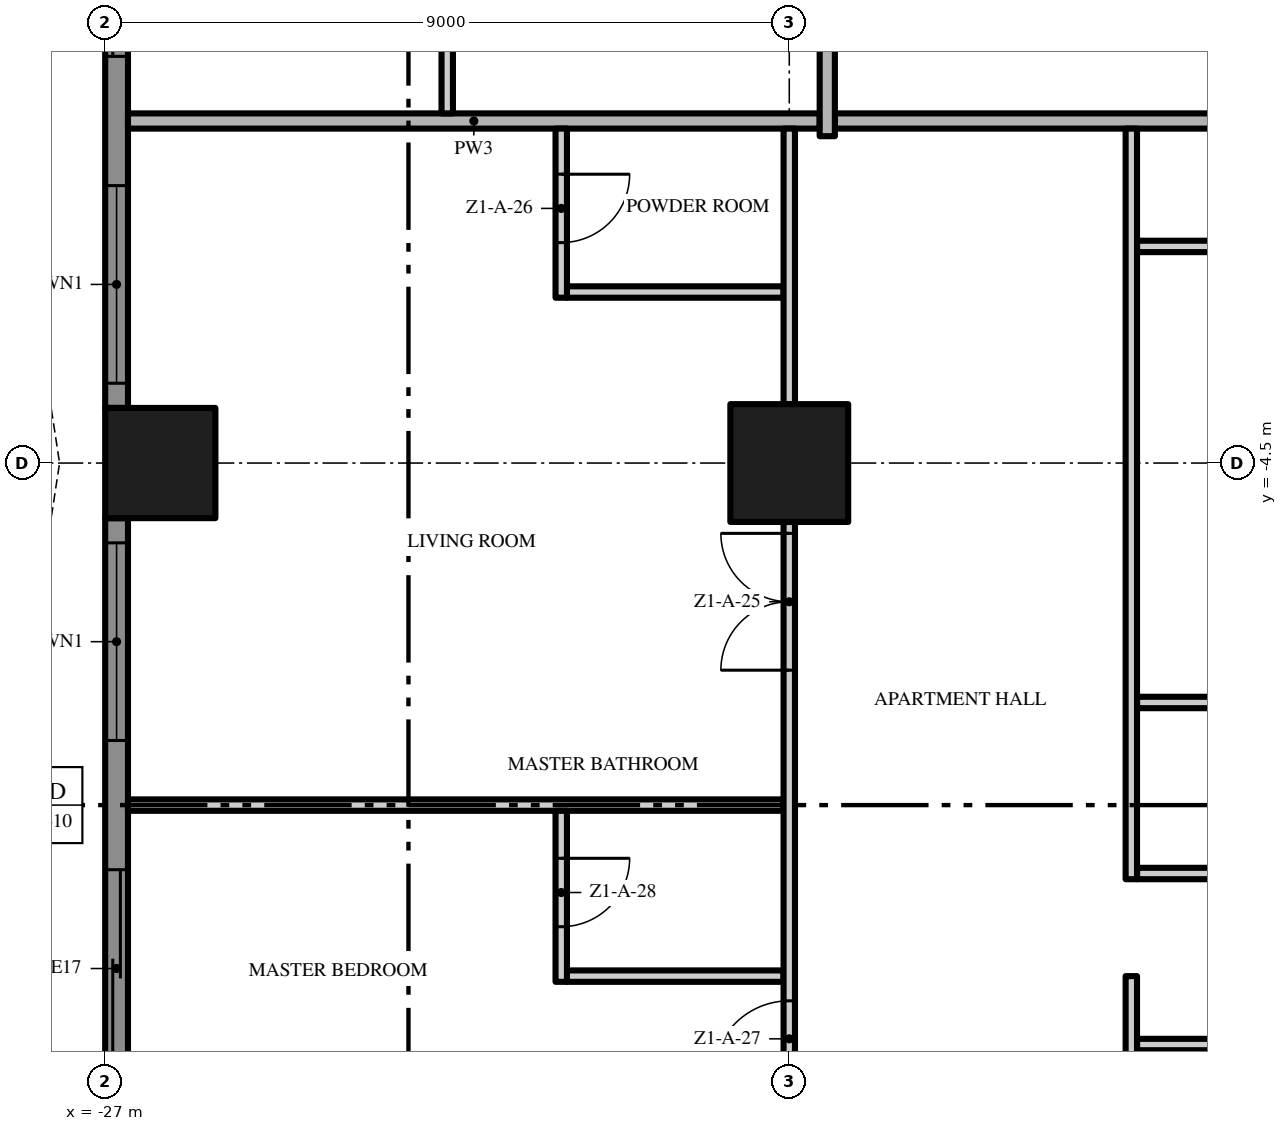
"""IFC4 building model, lengths in metres.
Left out: names, types, materials, properties, quantities, classifications, styles, units other than length and angle.
Written with IfcOpenShell. Run it as: python <this file> out.ifc"""

import sys

from ifc_helpers import new_model, si_unit, direction, frame, frame_2d, origin, origin_2d, place, context, subcontext, project, spatial, polyline, rectangle, outline, extrude, element, fill, save


model = new_model("IFC4")
c1 = context("Model", 3, precision=1e-05, world=origin(), true_north=direction((0.0, 1.0)))
c2 = subcontext(c1, "Body", "Model", "MODEL_VIEW")
j1 = project(units=[si_unit("LENGTHUNIT", "METRE"), si_unit("PLANEANGLEUNIT", "RADIAN")], contexts=[c1])
p1 = place(None, origin())
s1 = spatial("IfcSite", under=j1, at=p1, CompositionType="ELEMENT")
p2 = place(p1, origin())
s2 = spatial("IfcBuilding", under=s1, at=p2, CompositionType="ELEMENT")
p3 = place(p2, frame((0.0, 0.0, 22.6)))
s3 = spatial("IfcBuildingStorey", under=s2, at=p3, CompositionType="ELEMENT", Elevation=22.6)
p4 = place(p3, frame((-18.0, -4.5, 0.0), z_axis=(0.0, 0.0, 1.0), x_axis=(1.0, 0.0, 0.0)))
e1 = element("IfcColumn", 1, at=p4, inside=s3, PredefinedType="COLUMN", context=c2, shape_type="SweptSolid", body=[
    extrude(rectangle(XDim=1.55, YDim=1.55, at=origin_2d()), origin(), (0.0, 0.0, 1.0), 3.5),
])
p5 = place(p3, frame((-26.275, -4.5, 0.0), z_axis=(0.0, 0.0, 1.0), x_axis=(1.0, 0.0, 0.0)))
e2 = element("IfcColumn", 2, at=p5, inside=s3, PredefinedType="COLUMN", context=c2, shape_type="SweptSolid", body=[
    extrude(rectangle(XDim=1.45, YDim=1.45, at=origin_2d()), origin(), (0.0, 0.0, 1.0), 3.5),
])
p6 = place(p3, frame((-26.85, -3.775, 0.0), z_axis=(0.0, 0.0, 1.0), x_axis=(0.0, 1.0, 0.0)))
e3 = element("IfcWall", 3, at=p6, inside=s3, PredefinedType="SOLIDWALL", context=c2, shape_type="SweptSolid", body=[
    extrude(rectangle(XDim=7.55, YDim=0.3, at=frame_2d((3.775, 0.0))), origin(), (0.0, 0.0, 1.0), 3.5),
])
p7 = place(p6, frame((4.625, 0.0, 0.0)))
e4 = element("IfcOpeningElement", 4, at=p7, cuts=e3, PredefinedType="OPENING", context=c2, shape_type="SweptSolid", body=[
    extrude(rectangle(XDim=2.6, YDim=2.4, at=frame_2d((1.3, 1.2))), frame((0.0, 0.16, 0.0), z_axis=(0.0, -1.0, 0.0), x_axis=(1.0, 0.0, 0.0)), (0.0, 0.0, 1.0), 0.32),
])
p8 = place(p6, frame((0.325, 0.0, 0.45)))
e5 = element("IfcOpeningElement", 5, at=p8, cuts=e3, PredefinedType="OPENING", context=c2, shape_type="SweptSolid", body=[
    extrude(rectangle(XDim=2.6, YDim=2.65, at=frame_2d((1.3, 1.325))), frame((0.0, 0.16, 0.0), z_axis=(0.0, -1.0, 0.0), x_axis=(1.0, 0.0, 0.0)), (0.0, 0.0, 1.0), 0.32),
])
p9 = place(p3, frame((-26.85, -12.775, 0.0), z_axis=(0.0, 0.0, 1.0), x_axis=(0.0, 1.0, 0.0)))
e6 = element("IfcWall", 6, at=p9, inside=s3, PredefinedType="SOLIDWALL", context=c2, shape_type="SweptSolid", body=[
    extrude(rectangle(XDim=7.55, YDim=0.3, at=frame_2d((3.775, 0.0))), origin(), (0.0, 0.0, 1.0), 3.5),
])
p10 = place(p9, frame((4.625, 0.0, 0.45)))
e7 = element("IfcOpeningElement", 7, at=p10, cuts=e6, PredefinedType="OPENING", context=c2, shape_type="SweptSolid", body=[
    extrude(rectangle(XDim=2.6, YDim=2.65, at=frame_2d((1.3, 1.325))), frame((0.0, 0.16, 0.0), z_axis=(0.0, -1.0, 0.0), x_axis=(1.0, 0.0, 0.0)), (0.0, 0.0, 1.0), 0.32),
])
p11 = place(p9, frame((0.325, 0.0, 0.0)))
e8 = element("IfcOpeningElement", 8, at=p11, cuts=e6, PredefinedType="OPENING", context=c2, shape_type="SweptSolid", body=[
    extrude(rectangle(XDim=2.6, YDim=2.4, at=frame_2d((1.3, 1.2))), frame((0.0, 0.16, 0.0), z_axis=(0.0, -1.0, 0.0), x_axis=(1.0, 0.0, 0.0)), (0.0, 0.0, 1.0), 0.32),
])
p12 = place(p3, origin())
e9 = element("IfcWall", 9, at=p12, inside=s3, PredefinedType="USERDEFINED", context=c2, shape_type="SweptSolid", body=[
    extrude(outline(polyline([(-30.0, 18.0), (-29.771, 16.5), (-29.171, 15.0), (-28.429, 13.5), (-27.829, 12.0), (-27.6, 10.5), (-27.829, 9.0), (-28.429, 7.5), (-29.171, 6.0), (-29.771, 4.5), (-30.0, 3.0), (-29.771, 1.5), (-29.171, 0.0), (-28.429, -1.5), (-27.829, -3.0), (-27.6, -4.5), (-27.829, -6.0), (-28.429, -7.5), (-29.171, -9.0), (-29.771, -10.5), (-30.0, -12.0), (-29.771, -13.5), (-29.171, -15.0), (-28.429, -16.5), (-27.829, -18.0), (-27.597, -17.907), (-28.201, -16.398), (-28.942, -14.898), (-29.528, -13.434), (-29.747, -12.0), (-29.528, -10.566), (-28.942, -9.102), (-28.201, -7.602), (-27.586, -6.066), (-27.347, -4.5), (-27.586, -2.934), (-28.201, -1.398), (-28.942, 0.102), (-29.528, 1.566), (-29.747, 3.0), (-29.528, 4.434), (-28.942, 5.898), (-28.201, 7.398), (-27.586, 8.934), (-27.347, 10.5), (-27.586, 12.066), (-28.201, 13.602), (-28.942, 15.102), (-29.528, 16.566), (-29.753, 18.038), (-30.0, 18.0)])), origin(), (0.0, 0.0, 1.0), 0.9),
])
p13 = place(p3, frame((-13.425, -12.15, 0.0), z_axis=(0.0, 0.0, 1.0), x_axis=(1.0, 0.0, 0.0)))
e10 = element("IfcWall", 10, at=p13, inside=s3, PredefinedType="PARTITIONING", context=c2, shape_type="SweptSolid", body=[
    extrude(rectangle(XDim=4.35, YDim=0.15, at=frame_2d((2.175, 0.0))), origin(), (0.0, 0.0, 1.0), 3.5),
])
p14 = place(p3, frame((-20.925, -11.25, 0.0), z_axis=(0.0, 0.0, 1.0), x_axis=(1.0, 0.0, 0.0)))
e11 = element("IfcWall", 11, at=p14, inside=s3, PredefinedType="PARTITIONING", context=c2, shape_type="SweptSolid", body=[
    extrude(rectangle(XDim=2.85, YDim=0.15, at=frame_2d((1.425, 0.0))), origin(), (0.0, 0.0, 1.0), 3.5),
])
p15 = place(p3, frame((-13.425, -9.9, 0.0), z_axis=(0.0, 0.0, 1.0), x_axis=(1.0, 0.0, 0.0)))
e12 = element("IfcWall", 12, at=p15, inside=s3, PredefinedType="PARTITIONING", context=c2, shape_type="SweptSolid", body=[
    extrude(rectangle(XDim=4.35, YDim=0.15, at=frame_2d((2.175, 0.0))), origin(), (0.0, 0.0, 1.0), 3.5),
])
p16 = place(p15, frame((1.75, 0.0, 0.0)))
e13 = element("IfcOpeningElement", 13, at=p16, cuts=e12, PredefinedType="OPENING", context=c2, shape_type="SweptSolid", body=[
    extrude(rectangle(XDim=0.9, YDim=2.1, at=frame_2d((0.45, 1.05))), frame((0.0, 0.085, 0.0), z_axis=(0.0, -1.0, 0.0), x_axis=(1.0, 0.0, 0.0)), (0.0, 0.0, 1.0), 0.17),
])
p17 = place(p3, frame((-26.7, -9.0, 0.0), z_axis=(0.0, 0.0, 1.0), x_axis=(1.0, 0.0, 0.0)))
e14 = element("IfcWall", 14, at=p17, inside=s3, PredefinedType="PARTITIONING", context=c2, shape_type="SweptSolid", body=[
    extrude(rectangle(XDim=8.625, YDim=0.15, at=frame_2d((4.312, 0.0))), origin(), (0.0, 0.0, 1.0), 3.5),
])
p18 = place(p3, frame((-13.425, -7.65, 0.0), z_axis=(0.0, 0.0, 1.0), x_axis=(1.0, 0.0, 0.0)))
e15 = element("IfcWall", 15, at=p18, inside=s3, PredefinedType="PARTITIONING", context=c2, shape_type="SweptSolid", body=[
    extrude(rectangle(XDim=4.35, YDim=0.15, at=frame_2d((2.175, 0.0))), origin(), (0.0, 0.0, 1.0), 3.5),
])
p19 = place(p3, frame((-20.925, -2.25, 0.0), z_axis=(0.0, 0.0, 1.0), x_axis=(1.0, 0.0, 0.0)))
e16 = element("IfcWall", 16, at=p19, inside=s3, PredefinedType="PARTITIONING", context=c2, shape_type="SweptSolid", body=[
    extrude(rectangle(XDim=2.85, YDim=0.15, at=frame_2d((1.425, 0.0))), origin(), (0.0, 0.0, 1.0), 3.5),
])
p20 = place(p3, frame((-13.425, -1.65, 0.0), z_axis=(0.0, 0.0, 1.0), x_axis=(1.0, 0.0, 0.0)))
e17 = element("IfcWall", 17, at=p20, inside=s3, PredefinedType="PARTITIONING", context=c2, shape_type="SweptSolid", body=[
    extrude(rectangle(XDim=4.35, YDim=0.15, at=frame_2d((2.175, 0.0))), origin(), (0.0, 0.0, 1.0), 3.5),
])
p21 = place(p3, frame((-17.4, 0.0, 0.0), z_axis=(0.0, 0.0, 1.0), x_axis=(1.0, 0.0, 0.0)))
e18 = element("IfcWall", 18, at=p21, inside=s3, PredefinedType="PARTITIONING", context=c2, shape_type="SweptSolid", body=[
    extrude(rectangle(XDim=12.8, YDim=0.2, at=frame_2d((6.4, 0.0))), origin(), (0.0, 0.0, 1.0), 3.5),
])
p22 = place(p3, frame((-26.7, 0.0, 0.0), z_axis=(0.0, 0.0, 1.0), x_axis=(1.0, 0.0, 0.0)))
e19 = element("IfcWall", 19, at=p22, inside=s3, PredefinedType="PARTITIONING", context=c2, shape_type="SweptSolid", body=[
    extrude(rectangle(XDim=9.1, YDim=0.2, at=frame_2d((4.55, 0.0))), origin(), (0.0, 0.0, 1.0), 3.5),
])
p23 = place(p3, frame((-22.5, 0.1, 0.0), z_axis=(0.0, 0.0, 1.0), x_axis=(0.0, 1.0, 0.0)))
e20 = element("IfcWall", 20, at=p23, inside=s3, PredefinedType="PARTITIONING", context=c2, shape_type="SweptSolid", body=[
    extrude(rectangle(XDim=17.175, YDim=0.15, at=frame_2d((8.588, 0.0))), origin(), (0.0, 0.0, 1.0), 3.5),
])
p24 = place(p23, frame((1.65, 0.0, 0.0)))
e21 = element("IfcOpeningElement", 21, at=p24, cuts=e20, PredefinedType="OPENING", context=c2, shape_type="SweptSolid", body=[
    extrude(rectangle(XDim=1.0, YDim=2.4, at=frame_2d((0.5, 1.2))), frame((0.0, 0.085, 0.0), z_axis=(0.0, -1.0, 0.0), x_axis=(1.0, 0.0, 0.0)), (0.0, 0.0, 1.0), 0.17),
])
p25 = place(p23, frame((7.25, 0.0, 0.0)))
e22 = element("IfcOpeningElement", 22, at=p25, cuts=e20, PredefinedType="OPENING", context=c2, shape_type="SweptSolid", body=[
    extrude(rectangle(XDim=1.0, YDim=2.4, at=frame_2d((0.5, 1.2))), frame((0.0, 0.085, 0.0), z_axis=(0.0, -1.0, 0.0), x_axis=(1.0, 0.0, 0.0)), (0.0, 0.0, 1.0), 0.17),
])
p26 = place(p23, frame((9.5, 0.0, 0.0)))
e23 = element("IfcOpeningElement", 23, at=p26, cuts=e20, PredefinedType="OPENING", context=c2, shape_type="SweptSolid", body=[
    extrude(rectangle(XDim=1.0, YDim=2.4, at=frame_2d((0.5, 1.2))), frame((0.0, 0.085, 0.0), z_axis=(0.0, -1.0, 0.0), x_axis=(1.0, 0.0, 0.0)), (0.0, 0.0, 1.0), 0.17),
])
p27 = place(p23, frame((16.025, 0.0, 0.0)))
e24 = element("IfcOpeningElement", 24, at=p27, cuts=e20, PredefinedType="OPENING", context=c2, shape_type="SweptSolid", body=[
    extrude(rectangle(XDim=1.0, YDim=2.4, at=frame_2d((0.5, 1.2))), frame((0.0, 0.085, 0.0), z_axis=(0.0, -1.0, 0.0), x_axis=(1.0, 0.0, 0.0)), (0.0, 0.0, 1.0), 0.17),
])
p28 = place(p3, frame((-21.0, -9.075, 0.0), z_axis=(0.0, 0.0, 1.0), x_axis=(0.0, -1.0, 0.0)))
e25 = element("IfcWall", 25, at=p28, inside=s3, PredefinedType="PARTITIONING", context=c2, shape_type="SweptSolid", body=[
    extrude(rectangle(XDim=2.25, YDim=0.15, at=frame_2d((1.125, 0.0))), origin(), (0.0, 0.0, 1.0), 3.5),
])
p29 = place(p28, frame((0.625, 0.0, 0.0)))
e26 = element("IfcOpeningElement", 26, at=p29, cuts=e25, PredefinedType="OPENING", context=c2, shape_type="SweptSolid", body=[
    extrude(rectangle(XDim=0.9, YDim=2.1, at=frame_2d((0.45, 1.05))), frame((0.0, 0.085, 0.0), z_axis=(0.0, -1.0, 0.0), x_axis=(1.0, 0.0, 0.0)), (0.0, 0.0, 1.0), 0.17),
])
p30 = place(p3, frame((-21.0, -0.1, 0.0), z_axis=(0.0, 0.0, 1.0), x_axis=(0.0, -1.0, 0.0)))
e27 = element("IfcWall", 27, at=p30, inside=s3, PredefinedType="PARTITIONING", context=c2, shape_type="SweptSolid", body=[
    extrude(rectangle(XDim=2.225, YDim=0.15, at=frame_2d((1.113, 0.0))), origin(), (0.0, 0.0, 1.0), 3.5),
])
p31 = place(p30, frame((0.6, 0.0, 0.0)))
e28 = element("IfcOpeningElement", 28, at=p31, cuts=e27, PredefinedType="OPENING", context=c2, shape_type="SweptSolid", body=[
    extrude(rectangle(XDim=0.9, YDim=2.1, at=frame_2d((0.45, 1.05))), frame((0.0, 0.085, 0.0), z_axis=(0.0, -1.0, 0.0), x_axis=(1.0, 0.0, 0.0)), (0.0, 0.0, 1.0), 0.17),
])
p32 = place(p3, frame((-18.0, -12.725, 0.0), z_axis=(0.0, 0.0, 1.0), x_axis=(0.0, 1.0, 0.0)))
e29 = element("IfcWall", 29, at=p32, inside=s3, PredefinedType="PARTITIONING", context=c2, shape_type="SweptSolid", body=[
    extrude(rectangle(XDim=7.45, YDim=0.15, at=frame_2d((3.725, 0.0))), origin(), (0.0, 0.0, 1.0), 3.5),
])
p33 = place(p32, frame((5.5, 0.0, 0.0)))
e30 = element("IfcOpeningElement", 30, at=p33, cuts=e29, PredefinedType="OPENING", context=c2, shape_type="SweptSolid", body=[
    extrude(rectangle(XDim=1.8, YDim=2.4, at=frame_2d((0.9, 1.2))), frame((0.0, 0.085, 0.0), z_axis=(0.0, -1.0, 0.0), x_axis=(1.0, 0.0, 0.0)), (0.0, 0.0, 1.0), 0.17),
])
p34 = place(p32, frame((0.15, 0.0, 0.0)))
e31 = element("IfcOpeningElement", 31, at=p34, cuts=e29, PredefinedType="OPENING", context=c2, shape_type="SweptSolid", body=[
    extrude(rectangle(XDim=1.0, YDim=2.4, at=frame_2d((0.5, 1.2))), frame((0.0, 0.085, 0.0), z_axis=(0.0, -1.0, 0.0), x_axis=(1.0, 0.0, 0.0)), (0.0, 0.0, 1.0), 0.17),
])
p35 = place(p3, frame((-18.0, -3.725, 0.0), z_axis=(0.0, 0.0, 1.0), x_axis=(0.0, 1.0, 0.0)))
e32 = element("IfcWall", 32, at=p35, inside=s3, PredefinedType="PARTITIONING", context=c2, shape_type="SweptSolid", body=[
    extrude(rectangle(XDim=3.625, YDim=0.15, at=frame_2d((1.812, 0.0))), origin(), (0.0, 0.0, 1.0), 3.5),
])
p36 = place(p3, frame((-17.5, -0.2, 0.0), z_axis=(0.0, 0.0, 1.0), x_axis=(0.0, 1.0, 0.0)))
e33 = element("IfcWall", 33, at=p36, inside=s3, PredefinedType="PARTITIONING", context=c2, shape_type="SweptSolid", body=[
    extrude(rectangle(XDim=3.925, YDim=0.2, at=frame_2d((1.962, 0.0))), origin(), (0.0, 0.0, 1.0), 3.5),
])
p37 = place(p3, frame((-13.5, -11.25, 0.0), z_axis=(0.0, 0.0, 1.0), x_axis=(0.0, -1.0, 0.0)))
e34 = element("IfcWall", 34, at=p37, inside=s3, PredefinedType="PARTITIONING", context=c2, shape_type="SweptSolid", body=[
    extrude(rectangle(XDim=10.95, YDim=0.15, at=frame_2d((5.475, 0.0))), origin(), (0.0, 0.0, 1.0), 3.5),
])
p38 = place(p37, frame((1.8, 0.0, 0.0)))
e35 = element("IfcOpeningElement", 35, at=p38, cuts=e34, PredefinedType="OPENING", context=c2, shape_type="SweptSolid", body=[
    extrude(rectangle(XDim=0.8, YDim=2.0, at=frame_2d((0.4, 1.0))), frame((0.0, 0.085, 0.0), z_axis=(0.0, -1.0, 0.0), x_axis=(1.0, 0.0, 0.0)), (0.0, 0.0, 1.0), 0.17),
])
p39 = place(p37, frame((9.95, 0.0, 0.0)))
e36 = element("IfcOpeningElement", 36, at=p39, cuts=e34, PredefinedType="OPENING", context=c2, shape_type="SweptSolid", body=[
    extrude(rectangle(XDim=0.8, YDim=2.0, at=frame_2d((0.4, 1.0))), frame((0.0, 0.085, 0.0), z_axis=(0.0, -1.0, 0.0), x_axis=(1.0, 0.0, 0.0)), (0.0, 0.0, 1.0), 0.17),
])
p40 = place(p3, frame((-13.5, -9.975, 0.0), z_axis=(0.0, 0.0, 1.0), x_axis=(0.0, 1.0, 0.0)))
e37 = element("IfcWall", 37, at=p40, inside=s3, PredefinedType="PARTITIONING", context=c2, shape_type="SweptSolid", body=[
    extrude(rectangle(XDim=9.875, YDim=0.15, at=frame_2d((4.938, 0.0))), origin(), (0.0, 0.0, 1.0), 3.5),
])
p41 = place(p7, origin())
e38 = element("IfcDoor", 38, at=p41, inside=s3, OperationType="SINGLE_SWING_LEFT", PredefinedType="DOOR", context=c2, shape_type="SweptSolid", body=[
    extrude(rectangle(XDim=2.6, YDim=2.4, at=frame_2d((1.3, 1.2))), frame((0.0, 0.025, 0.0), z_axis=(0.0, -1.0, 0.0), x_axis=(1.0, 0.0, 0.0)), (0.0, 0.0, 1.0), 0.05),
])
fill(e4, e38)
p42 = place(p8, origin())
e39 = element("IfcWindow", 39, at=p42, inside=s3, PartitioningType="SINGLE_PANEL", PredefinedType="WINDOW", context=c2, shape_type="SweptSolid", body=[
    extrude(rectangle(XDim=2.6, YDim=2.65, at=frame_2d((1.3, 1.325))), frame((0.0, 0.03, 0.0), z_axis=(0.0, -1.0, 0.0), x_axis=(1.0, 0.0, 0.0)), (0.0, 0.0, 1.0), 0.06),
])
fill(e5, e39)
p43 = place(p10, origin())
e40 = element("IfcWindow", 40, at=p43, inside=s3, PartitioningType="SINGLE_PANEL", PredefinedType="WINDOW", context=c2, shape_type="SweptSolid", body=[
    extrude(rectangle(XDim=2.6, YDim=2.65, at=frame_2d((1.3, 1.325))), frame((0.0, 0.03, 0.0), z_axis=(0.0, -1.0, 0.0), x_axis=(1.0, 0.0, 0.0)), (0.0, 0.0, 1.0), 0.06),
])
fill(e7, e40)
p44 = place(p11, origin())
e41 = element("IfcDoor", 41, at=p44, inside=s3, OperationType="SINGLE_SWING_LEFT", PredefinedType="DOOR", context=c2, shape_type="SweptSolid", body=[
    extrude(rectangle(XDim=2.6, YDim=2.4, at=frame_2d((1.3, 1.2))), frame((0.0, 0.025, 0.0), z_axis=(0.0, -1.0, 0.0), x_axis=(1.0, 0.0, 0.0)), (0.0, 0.0, 1.0), 0.05),
])
fill(e8, e41)
p45 = place(p33, origin())
e42 = element("IfcDoor", 42, at=p45, inside=s3, OperationType="DOUBLE_DOOR_SINGLE_SWING", PredefinedType="DOOR", context=c2, shape_type="SweptSolid", body=[
    extrude(rectangle(XDim=1.8, YDim=2.4, at=frame_2d((0.9, 1.2))), frame((0.0, 0.025, 0.0), z_axis=(0.0, -1.0, 0.0), x_axis=(1.0, 0.0, 0.0)), (0.0, 0.0, 1.0), 0.05),
])
fill(e30, e42)
p46 = place(p31, origin())
e43 = element("IfcDoor", 43, at=p46, inside=s3, OperationType="SINGLE_SWING_LEFT", PredefinedType="DOOR", context=c2, shape_type="SweptSolid", body=[
    extrude(rectangle(XDim=0.9, YDim=2.1, at=frame_2d((0.45, 1.05))), frame((0.0, 0.025, 0.0), z_axis=(0.0, -1.0, 0.0), x_axis=(1.0, 0.0, 0.0)), (0.0, 0.0, 1.0), 0.05),
])
fill(e28, e43)
p47 = place(p34, origin())
e44 = element("IfcDoor", 44, at=p47, inside=s3, OperationType="SINGLE_SWING_LEFT", PredefinedType="DOOR", context=c2, shape_type="SweptSolid", body=[
    extrude(rectangle(XDim=1.0, YDim=2.4, at=frame_2d((0.5, 1.2))), frame((0.0, 0.025, 0.0), z_axis=(0.0, -1.0, 0.0), x_axis=(1.0, 0.0, 0.0)), (0.0, 0.0, 1.0), 0.05),
])
fill(e31, e44)
p48 = place(p29, origin())
e45 = element("IfcDoor", 45, at=p48, inside=s3, OperationType="SINGLE_SWING_LEFT", PredefinedType="DOOR", context=c2, shape_type="SweptSolid", body=[
    extrude(rectangle(XDim=0.9, YDim=2.1, at=frame_2d((0.45, 1.05))), frame((0.0, 0.025, 0.0), z_axis=(0.0, -1.0, 0.0), x_axis=(1.0, 0.0, 0.0)), (0.0, 0.0, 1.0), 0.05),
])
fill(e26, e45)
save(model, sys.argv[1])
